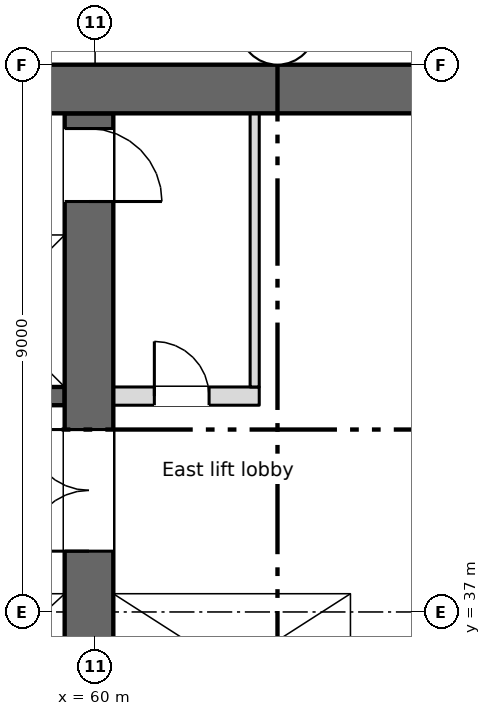
"""IFC4 building model, lengths in metres.
Left out: names, types, materials, properties, quantities, classifications, styles, units other than length and angle.
Written with IfcOpenShell. Run it as: python <this file> out.ifc"""

import sys

from ifc_helpers import new_model, si_unit, direction, frame, frame_2d, origin, place, context, subcontext, project, spatial, rectangle, extrude, element, fill, save


model = new_model("IFC4")
c1 = context("Model", 3, precision=1e-05, world=origin(), true_north=direction((0.0, 1.0)))
c2 = subcontext(c1, "Body", "Model", "MODEL_VIEW")
j1 = project(units=[si_unit("LENGTHUNIT", "METRE"), si_unit("PLANEANGLEUNIT", "RADIAN")], contexts=[c1])
p1 = place(None, origin())
s1 = spatial("IfcSite", under=j1, at=p1, CompositionType="ELEMENT")
p2 = place(p1, origin())
s2 = spatial("IfcBuilding", under=s1, at=p2, CompositionType="ELEMENT")
p3 = place(p2, frame((0.0, 0.0, 128.75)))
s3 = spatial("IfcBuildingStorey", under=s2, at=p3, CompositionType="ELEMENT", Elevation=128.75)
p4 = place(p3, frame((5.55, 45.6, 0.0), z_axis=(0.0, 0.0, 1.0), x_axis=(1.0, 0.0, 0.0)))
e1 = element("IfcWall", 1, at=p4, inside=s3, PredefinedType="SHEAR", context=c2, shape_type="SweptSolid", body=[
    extrude(rectangle(XDim=60.9, YDim=0.8, at=frame_2d((30.45, 0.0))), origin(), (0.0, 0.0, 1.0), 3.35),
])
p5 = place(p4, frame((7.2, 0.0, 0.6)))
e2 = element("IfcOpeningElement", 2, at=p5, cuts=e1, PredefinedType="OPENING", context=c2, shape_type="SweptSolid", body=[
    extrude(rectangle(XDim=0.6, YDim=2.4, at=frame_2d((0.3, 1.2))), frame((0.0, 0.41, 0.0), z_axis=(0.0, -1.0, 0.0), x_axis=(1.0, 0.0, 0.0)), (0.0, 0.0, 1.0), 0.82),
])
p6 = place(p3, frame((64.35, 34.8, 0.0), z_axis=(0.0, 0.0, 1.0), x_axis=(0.0, 1.0, 0.0)))
e3 = element("IfcWall", 3, at=p6, inside=s3, PredefinedType="SHEAR", context=c2, shape_type="SweptSolid", body=[
    extrude(rectangle(XDim=10.4, YDim=0.3, at=frame_2d((5.2, 0.0))), origin(), (0.0, 0.0, 1.0), 3.35),
])
p7 = place(p3, frame((59.9, 28.4, 0.0), z_axis=(0.0, 0.0, 1.0), x_axis=(0.0, 1.0, 0.0)))
e4 = element("IfcWall", 4, at=p7, inside=s3, PredefinedType="SHEAR", context=c2, shape_type="SweptSolid", body=[
    extrude(rectangle(XDim=16.8, YDim=0.8, at=frame_2d((8.4, 0.0))), origin(), (0.0, 0.0, 1.0), 3.35),
])
p8 = place(p7, frame((9.6, 0.0, 0.0)))
e5 = element("IfcOpeningElement", 5, at=p8, cuts=e4, PredefinedType="OPENING", context=c2, shape_type="SweptSolid", body=[
    extrude(rectangle(XDim=2.0, YDim=2.1, at=frame_2d((1.0, 1.05))), frame((0.0, 0.41, 0.0), z_axis=(0.0, -1.0, 0.0), x_axis=(1.0, 0.0, 0.0)), (0.0, 0.0, 1.0), 0.82),
])
p9 = place(p7, frame((15.35, 0.0, 0.0)))
e6 = element("IfcOpeningElement", 6, at=p9, cuts=e4, PredefinedType="OPENING", context=c2, shape_type="SweptSolid", body=[
    extrude(rectangle(XDim=1.2, YDim=2.1, at=frame_2d((0.6, 1.05))), frame((0.0, 0.41, 0.0), z_axis=(0.0, -1.0, 0.0), x_axis=(1.0, 0.0, 0.0)), (0.0, 0.0, 1.0), 0.82),
])
p10 = place(p3, frame((47.3, 37.45, 0.0), z_axis=(0.0, 0.0, 1.0), x_axis=(1.0, 0.0, 0.0)))
e7 = element("IfcWall", 7, at=p10, inside=s3, PredefinedType="SHEAR", context=c2, shape_type="SweptSolid", body=[
    extrude(rectangle(XDim=12.2, YDim=0.3, at=frame_2d((6.1, 0.0))), origin(), (0.0, 0.0, 1.0), 3.35),
])
p11 = place(p10, frame((4.3, 0.0, 0.0)))
e8 = element("IfcOpeningElement", 8, at=p11, cuts=e7, PredefinedType="OPENING", context=c2, shape_type="SweptSolid", body=[
    extrude(rectangle(XDim=1.1, YDim=2.1, at=frame_2d((0.55, 1.05))), frame((0.0, 0.16, 0.0), z_axis=(0.0, -1.0, 0.0), x_axis=(1.0, 0.0, 0.0)), (0.0, 0.0, 1.0), 0.32),
])
p12 = place(p10, frame((7.3, 0.0, 0.0)))
e9 = element("IfcOpeningElement", 9, at=p12, cuts=e7, PredefinedType="OPENING", context=c2, shape_type="SweptSolid", body=[
    extrude(rectangle(XDim=1.1, YDim=2.1, at=frame_2d((0.55, 1.05))), frame((0.0, 0.16, 0.0), z_axis=(0.0, -1.0, 0.0), x_axis=(1.0, 0.0, 0.0)), (0.0, 0.0, 1.0), 0.32),
])
p13 = place(p10, frame((10.3, 0.0, 0.0)))
e10 = element("IfcOpeningElement", 10, at=p13, cuts=e7, PredefinedType="OPENING", context=c2, shape_type="SweptSolid", body=[
    extrude(rectangle(XDim=1.1, YDim=2.1, at=frame_2d((0.55, 1.05))), frame((0.0, 0.16, 0.0), z_axis=(0.0, -1.0, 0.0), x_axis=(1.0, 0.0, 0.0)), (0.0, 0.0, 1.0), 0.32),
])
p14 = place(p3, frame((60.3, 37.45, 0.0), z_axis=(0.0, 0.0, 1.0), x_axis=(1.0, 0.0, 0.0)))
e11 = element("IfcWall", 11, at=p14, inside=s3, PredefinedType="SHEAR", context=c2, shape_type="SweptSolid", body=[
    extrude(rectangle(XDim=3.9, YDim=0.3, at=frame_2d((1.95, 0.0))), origin(), (0.0, 0.0, 1.0), 3.35),
])
p15 = place(p14, frame((1.4, 0.0, 0.0)))
e12 = element("IfcOpeningElement", 12, at=p15, cuts=e11, PredefinedType="OPENING", context=c2, shape_type="SweptSolid", body=[
    extrude(rectangle(XDim=1.1, YDim=2.1, at=frame_2d((0.55, 1.05))), frame((0.0, 0.16, 0.0), z_axis=(0.0, -1.0, 0.0), x_axis=(1.0, 0.0, 0.0)), (0.0, 0.0, 1.0), 0.32),
])
p16 = place(p3, frame((18.5, 40.55, 0.0), z_axis=(0.0, 0.0, 1.0), x_axis=(1.0, 0.0, 0.0)))
e13 = element("IfcWall", 13, at=p16, inside=s3, PredefinedType="SHEAR", context=c2, shape_type="SweptSolid", body=[
    extrude(rectangle(XDim=41.0, YDim=0.3, at=frame_2d((20.5, 0.0))), origin(), (0.0, 0.0, 1.0), 3.35),
])
p17 = place(p16, frame((18.65, 0.0, 0.0)))
e14 = element("IfcOpeningElement", 14, at=p17, cuts=e13, PredefinedType="OPENING", context=c2, shape_type="SweptSolid", body=[
    extrude(rectangle(XDim=0.9, YDim=2.1, at=frame_2d((0.45, 1.05))), frame((0.0, 0.16, 0.0), z_axis=(0.0, -1.0, 0.0), x_axis=(1.0, 0.0, 0.0)), (0.0, 0.0, 1.0), 0.32),
])
p18 = place(p16, frame((6.175, 0.0, 0.0)))
e15 = element("IfcOpeningElement", 15, at=p18, cuts=e13, PredefinedType="OPENING", context=c2, shape_type="SweptSolid", body=[
    extrude(rectangle(XDim=1.1, YDim=2.1, at=frame_2d((0.55, 1.05))), frame((0.0, 0.16, 0.0), z_axis=(0.0, -1.0, 0.0), x_axis=(1.0, 0.0, 0.0)), (0.0, 0.0, 1.0), 0.32),
])
p19 = place(p16, frame((8.925, 0.0, 0.0)))
e16 = element("IfcOpeningElement", 16, at=p19, cuts=e13, PredefinedType="OPENING", context=c2, shape_type="SweptSolid", body=[
    extrude(rectangle(XDim=1.1, YDim=2.1, at=frame_2d((0.55, 1.05))), frame((0.0, 0.16, 0.0), z_axis=(0.0, -1.0, 0.0), x_axis=(1.0, 0.0, 0.0)), (0.0, 0.0, 1.0), 0.32),
])
p20 = place(p16, frame((11.675, 0.0, 0.0)))
e17 = element("IfcOpeningElement", 17, at=p20, cuts=e13, PredefinedType="OPENING", context=c2, shape_type="SweptSolid", body=[
    extrude(rectangle(XDim=1.1, YDim=2.1, at=frame_2d((0.55, 1.05))), frame((0.0, 0.16, 0.0), z_axis=(0.0, -1.0, 0.0), x_axis=(1.0, 0.0, 0.0)), (0.0, 0.0, 1.0), 0.32),
])
p21 = place(p16, frame((30.925, 0.0, 0.0)))
e18 = element("IfcOpeningElement", 18, at=p21, cuts=e13, PredefinedType="OPENING", context=c2, shape_type="SweptSolid", body=[
    extrude(rectangle(XDim=1.1, YDim=2.1, at=frame_2d((0.55, 1.05))), frame((0.0, 0.16, 0.0), z_axis=(0.0, -1.0, 0.0), x_axis=(1.0, 0.0, 0.0)), (0.0, 0.0, 1.0), 0.32),
])
p22 = place(p16, frame((33.675, 0.0, 0.0)))
e19 = element("IfcOpeningElement", 19, at=p22, cuts=e13, PredefinedType="OPENING", context=c2, shape_type="SweptSolid", body=[
    extrude(rectangle(XDim=1.1, YDim=2.1, at=frame_2d((0.55, 1.05))), frame((0.0, 0.16, 0.0), z_axis=(0.0, -1.0, 0.0), x_axis=(1.0, 0.0, 0.0)), (0.0, 0.0, 1.0), 0.32),
])
p23 = place(p16, frame((36.375, 0.0, 0.0)))
e20 = element("IfcOpeningElement", 20, at=p23, cuts=e13, PredefinedType="OPENING", context=c2, shape_type="SweptSolid", body=[
    extrude(rectangle(XDim=1.2, YDim=2.1, at=frame_2d((0.6, 1.05))), frame((0.0, 0.16, 0.0), z_axis=(0.0, -1.0, 0.0), x_axis=(1.0, 0.0, 0.0)), (0.0, 0.0, 1.0), 0.32),
])
p24 = place(p16, frame((39.15, 0.0, 0.0)))
e21 = element("IfcOpeningElement", 21, at=p24, cuts=e13, PredefinedType="OPENING", context=c2, shape_type="SweptSolid", body=[
    extrude(rectangle(XDim=1.2, YDim=2.1, at=frame_2d((0.6, 1.05))), frame((0.0, 0.16, 0.0), z_axis=(0.0, -1.0, 0.0), x_axis=(1.0, 0.0, 0.0)), (0.0, 0.0, 1.0), 0.32),
])
p25 = place(p3, frame((18.5, 43.35, 0.0), z_axis=(0.0, 0.0, 1.0), x_axis=(1.0, 0.0, 0.0)))
e22 = element("IfcWall", 22, at=p25, inside=s3, PredefinedType="SHEAR", context=c2, shape_type="SweptSolid", body=[
    extrude(rectangle(XDim=41.0, YDim=0.3, at=frame_2d((20.5, 0.0))), origin(), (0.0, 0.0, 1.0), 3.35),
])
p26 = place(p3, frame((60.3, 40.55, 0.0), z_axis=(0.0, 0.0, 1.0), x_axis=(1.0, 0.0, 0.0)))
e23 = element("IfcWall", 23, at=p26, inside=s3, PredefinedType="PARTITIONING", context=c2, shape_type="SweptSolid", body=[
    extrude(rectangle(XDim=2.4, YDim=0.3, at=frame_2d((1.2, 0.0))), origin(), (0.0, 0.0, 1.0), 3.35),
])
p27 = place(p26, frame((0.675, 0.0, 0.0)))
e24 = element("IfcOpeningElement", 24, at=p27, cuts=e23, PredefinedType="OPENING", context=c2, shape_type="SweptSolid", body=[
    extrude(rectangle(XDim=0.9, YDim=2.1, at=frame_2d((0.45, 1.05))), frame((0.0, 0.16, 0.0), z_axis=(0.0, -1.0, 0.0), x_axis=(1.0, 0.0, 0.0)), (0.0, 0.0, 1.0), 0.32),
])
p28 = place(p3, frame((62.625, 40.7, 0.0), z_axis=(0.0, 0.0, 1.0), x_axis=(0.0, 1.0, 0.0)))
e25 = element("IfcWall", 25, at=p28, inside=s3, PredefinedType="PARTITIONING", context=c2, shape_type="SweptSolid", body=[
    extrude(rectangle(XDim=4.5, YDim=0.15, at=frame_2d((2.25, 0.0))), origin(), (0.0, 0.0, 1.0), 3.35),
])
p29 = place(p27, origin())
e26 = element("IfcDoor", 26, at=p29, inside=s3, OperationType="SINGLE_SWING_LEFT", PredefinedType="DOOR", context=c2, shape_type="SweptSolid", body=[
    extrude(rectangle(XDim=0.9, YDim=2.1, at=frame_2d((0.45, 1.05))), frame((0.0, 0.025, 0.0), z_axis=(0.0, -1.0, 0.0), x_axis=(1.0, 0.0, 0.0)), (0.0, 0.0, 1.0), 0.05),
])
fill(e24, e26)
p30 = place(p15, origin())
e27 = element("IfcDoor", 27, at=p30, inside=s3, OperationType="SLIDING_TO_LEFT", PredefinedType="DOOR", context=c2, shape_type="SweptSolid", body=[
    extrude(rectangle(XDim=1.1, YDim=2.1, at=frame_2d((0.55, 1.05))), frame((0.0, 0.025, 0.0), z_axis=(0.0, -1.0, 0.0), x_axis=(1.0, 0.0, 0.0)), (0.0, 0.0, 1.0), 0.05),
])
fill(e12, e27)
p31 = place(p8, origin())
e28 = element("IfcDoor", 28, at=p31, inside=s3, OperationType="DOUBLE_DOOR_SINGLE_SWING", PredefinedType="DOOR", context=c2, shape_type="SweptSolid", body=[
    extrude(rectangle(XDim=2.0, YDim=2.1, at=frame_2d((1.0, 1.05))), frame((0.0, 0.025, 0.0), z_axis=(0.0, -1.0, 0.0), x_axis=(1.0, 0.0, 0.0)), (0.0, 0.0, 1.0), 0.05),
])
fill(e5, e28)
p32 = place(p9, origin())
e29 = element("IfcDoor", 29, at=p32, inside=s3, OperationType="SINGLE_SWING_LEFT", PredefinedType="DOOR", context=c2, shape_type="SweptSolid", body=[
    extrude(rectangle(XDim=1.2, YDim=2.1, at=frame_2d((0.6, 1.05))), frame((0.0, 0.025, 0.0), z_axis=(0.0, -1.0, 0.0), x_axis=(1.0, 0.0, 0.0)), (0.0, 0.0, 1.0), 0.05),
])
fill(e6, e29)
save(model, sys.argv[1])
